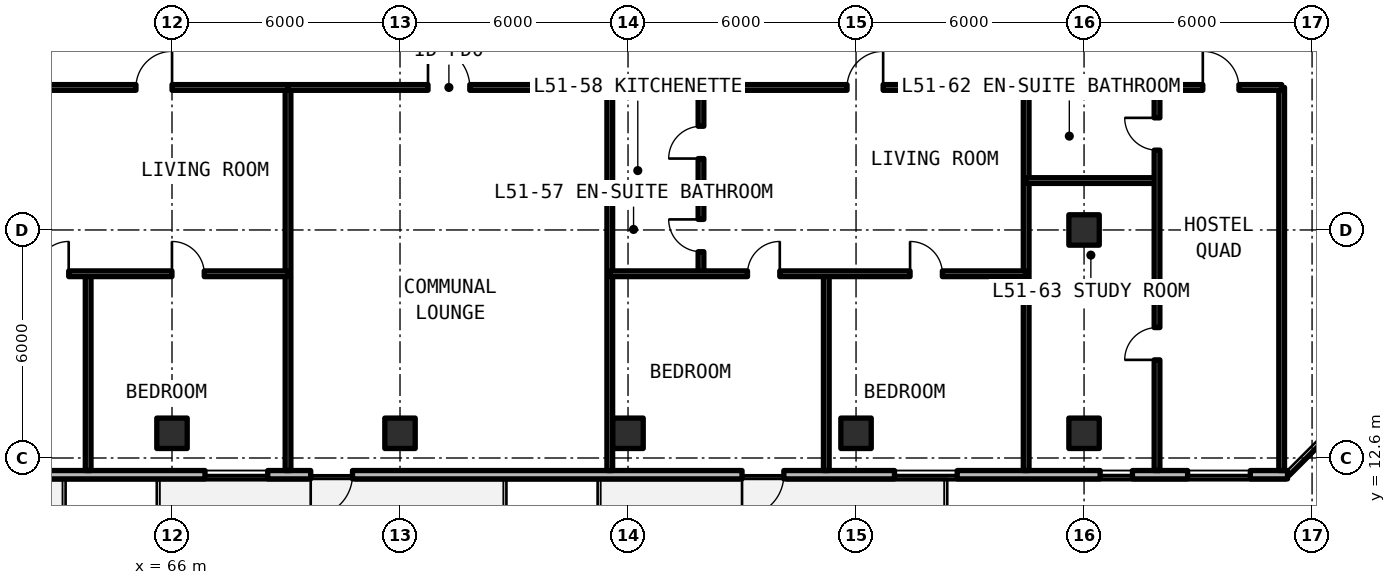
"""IFC4 building model, lengths in metres.
Left out: names, types, materials, properties, quantities, classifications, styles, units other than length and angle.
Written with IfcOpenShell. Run it as: python <this file> out.ifc"""

import sys

from ifc_helpers import new_model, si_unit, direction, frame, frame_2d, origin, origin_2d, place, context, subcontext, project, spatial, rectangle, extrude, element, fill, save


model = new_model("IFC4")
c1 = context("Model", 3, precision=1e-05, world=origin(), true_north=direction((0.0, 1.0)))
c2 = subcontext(c1, "Body", "Model", "MODEL_VIEW")
j1 = project(units=[si_unit("LENGTHUNIT", "METRE"), si_unit("PLANEANGLEUNIT", "RADIAN")], contexts=[c1])
p1 = place(None, origin())
s1 = spatial("IfcSite", under=j1, at=p1, CompositionType="ELEMENT")
p2 = place(p1, origin())
s2 = spatial("IfcBuilding", under=s1, at=p2, CompositionType="ELEMENT")
p3 = place(p2, frame((0.0, 0.0, 185.13)))
s3 = spatial("IfcBuildingStorey", under=s2, at=p3, CompositionType="ELEMENT", Elevation=185.13)
for number, where, z_axis, x_axis in (
    (1, (90.0, 18.6, 0.0), (0.0, 0.0, 1.0), (1.0, 0.0, 0.0)),
    (2, (66.0, 13.25, 0.0), (0.0, 0.0, 1.0), (1.0, 0.0, 0.0)),
    (3, (72.0, 13.25, 0.0), (0.0, 0.0, 1.0), (1.0, 0.0, 0.0)),
    (4, (78.0, 13.25, 0.0), (0.0, 0.0, 1.0), (1.0, 0.0, 0.0)),
    (5, (84.0, 13.25, 0.0), (0.0, 0.0, 1.0), (1.0, 0.0, 0.0)),
    (6, (90.0, 13.25, 0.0), (0.0, 0.0, 1.0), (1.0, 0.0, 0.0)),
):
    element("IfcColumn", number, at=place(p3, frame(where, z_axis=z_axis, x_axis=x_axis)), inside=s3, PredefinedType="COLUMN", context=c2, shape_type="SweptSolid", body=[
        extrude(rectangle(XDim=0.8, YDim=0.8, at=origin_2d()), origin(), (0.0, 0.0, 1.0), 3.3),
    ])
p4 = place(p3, frame((52.11, 12.16, 0.0), z_axis=(0.0, 0.0, 1.0), x_axis=(1.0, 0.0, 0.0)))
e7 = element("IfcWall", 7, at=p4, inside=s3, PredefinedType="SOLIDWALL", context=c2, shape_type="SweptSolid", body=[
    extrude(rectangle(XDim=43.244, YDim=0.22, at=frame_2d((21.622, 0.0))), origin(), (0.0, 0.0, 1.0), 3.08),
])
p5 = place(p4, frame((4.19, 0.0, 0.0)))
e8 = element("IfcOpeningElement", 8, at=p5, cuts=e7, PredefinedType="OPENING", context=c2, shape_type="SweptSolid", body=[
    extrude(rectangle(XDim=1.1, YDim=2.15, at=frame_2d((0.55, 1.075))), frame((0.0, 0.12, 0.0), z_axis=(0.0, -1.0, 0.0), x_axis=(1.0, 0.0, 0.0)), (0.0, 0.0, 1.0), 0.24),
])
p6 = place(p4, frame((17.54, 0.0, 0.0)))
e9 = element("IfcOpeningElement", 9, at=p6, cuts=e7, PredefinedType="OPENING", context=c2, shape_type="SweptSolid", body=[
    extrude(rectangle(XDim=1.1, YDim=2.15, at=frame_2d((0.55, 1.075))), frame((0.0, 0.12, 0.0), z_axis=(0.0, -1.0, 0.0), x_axis=(1.0, 0.0, 0.0)), (0.0, 0.0, 1.0), 0.24),
])
p7 = place(p4, frame((28.89, 0.0, 0.0)))
e10 = element("IfcOpeningElement", 10, at=p7, cuts=e7, PredefinedType="OPENING", context=c2, shape_type="SweptSolid", body=[
    extrude(rectangle(XDim=1.1, YDim=2.15, at=frame_2d((0.55, 1.075))), frame((0.0, 0.12, 0.0), z_axis=(0.0, -1.0, 0.0), x_axis=(1.0, 0.0, 0.0)), (0.0, 0.0, 1.0), 0.24),
])
p8 = place(p4, frame((8.66, 0.0, 0.78)))
e11 = element("IfcOpeningElement", 11, at=p8, cuts=e7, PredefinedType="OPENING", context=c2, shape_type="SweptSolid", body=[
    extrude(rectangle(XDim=1.65, YDim=1.66, at=frame_2d((0.825, 0.83))), frame((0.0, 0.12, 0.0), z_axis=(0.0, -1.0, 0.0), x_axis=(1.0, 0.0, 0.0)), (0.0, 0.0, 1.0), 0.24),
])
p9 = place(p4, frame((14.759, 0.0, 0.78)))
e12 = element("IfcOpeningElement", 12, at=p9, cuts=e7, PredefinedType="OPENING", context=c2, shape_type="SweptSolid", body=[
    extrude(rectangle(XDim=1.65, YDim=1.66, at=frame_2d((0.825, 0.83))), frame((0.0, 0.12, 0.0), z_axis=(0.0, -1.0, 0.0), x_axis=(1.0, 0.0, 0.0)), (0.0, 0.0, 1.0), 0.24),
])
p10 = place(p4, frame((32.902, 0.0, 0.78)))
e13 = element("IfcOpeningElement", 13, at=p10, cuts=e7, PredefinedType="OPENING", context=c2, shape_type="SweptSolid", body=[
    extrude(rectangle(XDim=1.65, YDim=1.66, at=frame_2d((0.825, 0.83))), frame((0.0, 0.12, 0.0), z_axis=(0.0, -1.0, 0.0), x_axis=(1.0, 0.0, 0.0)), (0.0, 0.0, 1.0), 0.24),
])
p11 = place(p4, frame((38.313, 0.0, 0.78)))
e14 = element("IfcOpeningElement", 14, at=p11, cuts=e7, PredefinedType="OPENING", context=c2, shape_type="SweptSolid", body=[
    extrude(rectangle(XDim=0.85, YDim=1.65, at=frame_2d((0.425, 0.825))), frame((0.0, 0.12, 0.0), z_axis=(0.0, -1.0, 0.0), x_axis=(1.0, 0.0, 0.0)), (0.0, 0.0, 1.0), 0.24),
])
p12 = place(p4, frame((40.615, 0.0, 0.78)))
e15 = element("IfcOpeningElement", 15, at=p12, cuts=e7, PredefinedType="OPENING", context=c2, shape_type="SweptSolid", body=[
    extrude(rectangle(XDim=1.65, YDim=1.66, at=frame_2d((0.825, 0.83))), frame((0.0, 0.12, 0.0), z_axis=(0.0, -1.0, 0.0), x_axis=(1.0, 0.0, 0.0)), (0.0, 0.0, 1.0), 0.24),
])
for number, where, z_axis, x_axis in (
    (16, (95.2, 12.27, 0.0), (0.0, 0.0, 1.0), (0.0, 1.0, 0.0)),
    (17, (69.053, 12.27, 0.0), (0.0, 0.0, 1.0), (0.0, 1.0, 0.0)),
):
    element("IfcWall", number, at=place(p3, frame(where, z_axis=z_axis, x_axis=x_axis)), inside=s3, PredefinedType="SOLIDWALL", context=c2, shape_type="SweptSolid", body=[
        extrude(rectangle(XDim=10.08, YDim=0.15, at=frame_2d((5.04, 0.0))), origin(), (0.0, 0.0, 1.0), 2.35),
    ])
p13 = place(p3, frame((63.794, 12.27, 0.0), z_axis=(0.0, 0.0, 1.0), x_axis=(0.0, 1.0, 0.0)))
e18 = element("IfcWall", 18, at=p13, inside=s3, PredefinedType="PARTITIONING", context=c2, shape_type="SweptSolid", body=[
    extrude(rectangle(XDim=5.178, YDim=0.15, at=frame_2d((2.589, 0.0))), origin(), (0.0, 0.0, 1.0), 2.35),
])
p14 = place(p3, frame((58.096, 17.448, 0.0), z_axis=(0.0, 0.0, 1.0), x_axis=(1.0, 0.0, 0.0)))
e19 = element("IfcWall", 19, at=p14, inside=s3, PredefinedType="PARTITIONING", context=c2, shape_type="SweptSolid", body=[
    extrude(rectangle(XDim=10.957, YDim=0.15, at=frame_2d((5.479, 0.0))), origin(), (0.0, 0.0, 1.0), 2.35),
])
p15 = place(p14, frame((4.335, 0.0, 0.0)))
e20 = element("IfcOpeningElement", 20, at=p15, cuts=e19, PredefinedType="OPENING", context=c2, shape_type="SweptSolid", body=[
    extrude(rectangle(XDim=0.85, YDim=2.1, at=frame_2d((0.425, 1.05))), frame((0.0, 0.085, 0.0), z_axis=(0.0, -1.0, 0.0), x_axis=(1.0, 0.0, 0.0)), (0.0, 0.0, 1.0), 0.17),
])
p16 = place(p14, frame((7.902, 0.0, 0.0)))
e21 = element("IfcOpeningElement", 21, at=p16, cuts=e19, PredefinedType="OPENING", context=c2, shape_type="SweptSolid", body=[
    extrude(rectangle(XDim=0.85, YDim=2.1, at=frame_2d((0.425, 1.05))), frame((0.0, 0.085, 0.0), z_axis=(0.0, -1.0, 0.0), x_axis=(1.0, 0.0, 0.0)), (0.0, 0.0, 1.0), 0.17),
])
p17 = place(p3, frame((58.096, 22.35, 0.0), z_axis=(0.0, 0.0, 1.0), x_axis=(1.0, 0.0, 0.0)))
e22 = element("IfcWall", 22, at=p17, inside=s3, PredefinedType="SOLIDWALL", context=c2, shape_type="SweptSolid", body=[
    extrude(rectangle(XDim=10.957, YDim=0.15, at=frame_2d((5.479, 0.0))), origin(), (0.0, 0.0, 1.0), 2.35),
])
p18 = place(p17, frame((6.955, 0.0, 0.0)))
e23 = element("IfcOpeningElement", 23, at=p18, cuts=e22, PredefinedType="OPENING", context=c2, shape_type="SweptSolid", body=[
    extrude(rectangle(XDim=0.95, YDim=2.15, at=frame_2d((0.475, 1.075))), frame((0.0, 0.085, 0.0), z_axis=(0.0, -1.0, 0.0), x_axis=(1.0, 0.0, 0.0)), (0.0, 0.0, 1.0), 0.17),
])
p19 = place(p3, frame((77.52, 12.27, 0.0), z_axis=(0.0, 0.0, 1.0), x_axis=(0.0, 1.0, 0.0)))
e24 = element("IfcWall", 24, at=p19, inside=s3, PredefinedType="SOLIDWALL", context=c2, shape_type="SweptSolid", body=[
    extrude(rectangle(XDim=10.08, YDim=0.15, at=frame_2d((5.04, 0.0))), origin(), (0.0, 0.0, 1.0), 2.35),
])
p20 = place(p3, frame((69.053, 22.35, 0.0), z_axis=(0.0, 0.0, 1.0), x_axis=(1.0, 0.0, 0.0)))
e25 = element("IfcWall", 25, at=p20, inside=s3, PredefinedType="SOLIDWALL", context=c2, shape_type="SweptSolid", body=[
    extrude(rectangle(XDim=8.467, YDim=0.15, at=frame_2d((4.233, 0.0))), origin(), (0.0, 0.0, 1.0), 2.35),
])
p21 = place(p20, frame((3.683, 0.0, 0.0)))
e26 = element("IfcOpeningElement", 26, at=p21, cuts=e25, PredefinedType="OPENING", context=c2, shape_type="SweptSolid", body=[
    extrude(rectangle(XDim=1.1, YDim=2.15, at=frame_2d((0.55, 1.075))), frame((0.0, 0.085, 0.0), z_axis=(0.0, -1.0, 0.0), x_axis=(1.0, 0.0, 0.0)), (0.0, 0.0, 1.0), 0.17),
])
p22 = place(p3, frame((88.477, 12.27, 0.0), z_axis=(0.0, 0.0, 1.0), x_axis=(0.0, 1.0, 0.0)))
e27 = element("IfcWall", 27, at=p22, inside=s3, PredefinedType="SOLIDWALL", context=c2, shape_type="SweptSolid", body=[
    extrude(rectangle(XDim=10.08, YDim=0.15, at=frame_2d((5.04, 0.0))), origin(), (0.0, 0.0, 1.0), 2.35),
])
p23 = place(p3, frame((77.52, 19.458, 0.0), z_axis=(0.0, 0.0, 1.0), x_axis=(1.0, 0.0, 0.0)))
e28 = element("IfcWall", 28, at=p23, inside=s3, PredefinedType="PARTITIONING", context=c2, shape_type="SweptSolid", body=[
    extrude(rectangle(XDim=2.4, YDim=0.15, at=frame_2d((1.2, 0.0))), origin(), (0.0, 0.0, 1.0), 2.35),
])
p24 = place(p3, frame((79.92, 17.448, 0.0), z_axis=(0.0, 0.0, 1.0), x_axis=(0.0, 1.0, 0.0)))
e29 = element("IfcWall", 29, at=p24, inside=s3, PredefinedType="PARTITIONING", context=c2, shape_type="SweptSolid", body=[
    extrude(rectangle(XDim=4.902, YDim=0.15, at=frame_2d((2.451, 0.0))), origin(), (0.0, 0.0, 1.0), 2.35),
])
p25 = place(p24, frame((0.58, 0.0, 0.0)))
e30 = element("IfcOpeningElement", 30, at=p25, cuts=e29, PredefinedType="OPENING", context=c2, shape_type="SweptSolid", body=[
    extrude(rectangle(XDim=0.85, YDim=2.1, at=frame_2d((0.425, 1.05))), frame((0.0, 0.085, 0.0), z_axis=(0.0, -1.0, 0.0), x_axis=(1.0, 0.0, 0.0)), (0.0, 0.0, 1.0), 0.17),
])
p26 = place(p24, frame((3.031, 0.0, 0.0)))
e31 = element("IfcOpeningElement", 31, at=p26, cuts=e29, PredefinedType="OPENING", context=c2, shape_type="SweptSolid", body=[
    extrude(rectangle(XDim=0.85, YDim=2.1, at=frame_2d((0.425, 1.05))), frame((0.0, 0.085, 0.0), z_axis=(0.0, -1.0, 0.0), x_axis=(1.0, 0.0, 0.0)), (0.0, 0.0, 1.0), 0.17),
])
p27 = place(p3, frame((83.217, 12.27, 0.0), z_axis=(0.0, 0.0, 1.0), x_axis=(0.0, 1.0, 0.0)))
e32 = element("IfcWall", 32, at=p27, inside=s3, PredefinedType="PARTITIONING", context=c2, shape_type="SweptSolid", body=[
    extrude(rectangle(XDim=5.178, YDim=0.15, at=frame_2d((2.589, 0.0))), origin(), (0.0, 0.0, 1.0), 2.35),
])
p28 = place(p3, frame((77.52, 17.448, 0.0), z_axis=(0.0, 0.0, 1.0), x_axis=(1.0, 0.0, 0.0)))
e33 = element("IfcWall", 33, at=p28, inside=s3, PredefinedType="PARTITIONING", context=c2, shape_type="SweptSolid", body=[
    extrude(rectangle(XDim=10.957, YDim=0.15, at=frame_2d((5.479, 0.0))), origin(), (0.0, 0.0, 1.0), 2.35),
])
p29 = place(p28, frame((3.624, 0.0, 0.0)))
e34 = element("IfcOpeningElement", 34, at=p29, cuts=e33, PredefinedType="OPENING", context=c2, shape_type="SweptSolid", body=[
    extrude(rectangle(XDim=0.85, YDim=2.1, at=frame_2d((0.425, 1.05))), frame((0.0, 0.085, 0.0), z_axis=(0.0, -1.0, 0.0), x_axis=(1.0, 0.0, 0.0)), (0.0, 0.0, 1.0), 0.17),
])
p30 = place(p28, frame((7.902, 0.0, 0.0)))
e35 = element("IfcOpeningElement", 35, at=p30, cuts=e33, PredefinedType="OPENING", context=c2, shape_type="SweptSolid", body=[
    extrude(rectangle(XDim=0.85, YDim=2.1, at=frame_2d((0.425, 1.05))), frame((0.0, 0.085, 0.0), z_axis=(0.0, -1.0, 0.0), x_axis=(1.0, 0.0, 0.0)), (0.0, 0.0, 1.0), 0.17),
])
p31 = place(p3, frame((77.52, 22.35, 0.0), z_axis=(0.0, 0.0, 1.0), x_axis=(1.0, 0.0, 0.0)))
e36 = element("IfcWall", 36, at=p31, inside=s3, PredefinedType="SOLIDWALL", context=c2, shape_type="SweptSolid", body=[
    extrude(rectangle(XDim=10.957, YDim=0.15, at=frame_2d((5.479, 0.0))), origin(), (0.0, 0.0, 1.0), 2.35),
])
p32 = place(p31, frame((6.243, 0.0, 0.0)))
e37 = element("IfcOpeningElement", 37, at=p32, cuts=e36, PredefinedType="OPENING", context=c2, shape_type="SweptSolid", body=[
    extrude(rectangle(XDim=0.95, YDim=2.15, at=frame_2d((0.475, 1.075))), frame((0.0, 0.085, 0.0), z_axis=(0.0, -1.0, 0.0), x_axis=(1.0, 0.0, 0.0)), (0.0, 0.0, 1.0), 0.17),
])
p33 = place(p3, frame((88.477, 19.9, 0.0), z_axis=(0.0, 0.0, 1.0), x_axis=(1.0, 0.0, 0.0)))
e38 = element("IfcWall", 38, at=p33, inside=s3, PredefinedType="PARTITIONING", context=c2, shape_type="SweptSolid", body=[
    extrude(rectangle(XDim=3.443, YDim=0.15, at=frame_2d((1.722, 0.0))), origin(), (0.0, 0.0, 1.0), 2.35),
])
p34 = place(p3, frame((91.92, 12.27, 0.0), z_axis=(0.0, 0.0, 1.0), x_axis=(0.0, 1.0, 0.0)))
e39 = element("IfcWall", 39, at=p34, inside=s3, PredefinedType="PARTITIONING", context=c2, shape_type="SweptSolid", body=[
    extrude(rectangle(XDim=10.08, YDim=0.15, at=frame_2d((5.04, 0.0))), origin(), (0.0, 0.0, 1.0), 2.35),
])
p35 = place(p34, frame((2.912, 0.0, 0.0)))
e40 = element("IfcOpeningElement", 40, at=p35, cuts=e39, PredefinedType="OPENING", context=c2, shape_type="SweptSolid", body=[
    extrude(rectangle(XDim=0.85, YDim=2.1, at=frame_2d((0.425, 1.05))), frame((0.0, 0.085, 0.0), z_axis=(0.0, -1.0, 0.0), x_axis=(1.0, 0.0, 0.0)), (0.0, 0.0, 1.0), 0.17),
])
p36 = place(p34, frame((8.43, 0.0, 0.0)))
e41 = element("IfcOpeningElement", 41, at=p36, cuts=e39, PredefinedType="OPENING", context=c2, shape_type="SweptSolid", body=[
    extrude(rectangle(XDim=0.85, YDim=2.1, at=frame_2d((0.425, 1.05))), frame((0.0, 0.085, 0.0), z_axis=(0.0, -1.0, 0.0), x_axis=(1.0, 0.0, 0.0)), (0.0, 0.0, 1.0), 0.17),
])
p37 = place(p3, frame((88.477, 22.35, 0.0), z_axis=(0.0, 0.0, 1.0), x_axis=(1.0, 0.0, 0.0)))
e42 = element("IfcWall", 42, at=p37, inside=s3, PredefinedType="SOLIDWALL", context=c2, shape_type="SweptSolid", body=[
    extrude(rectangle(XDim=6.723, YDim=0.15, at=frame_2d((3.362, 0.0))), origin(), (0.0, 0.0, 1.0), 2.35),
])
p38 = place(p37, frame((4.648, 0.0, 0.0)))
e43 = element("IfcOpeningElement", 43, at=p38, cuts=e42, PredefinedType="OPENING", context=c2, shape_type="SweptSolid", body=[
    extrude(rectangle(XDim=0.95, YDim=2.15, at=frame_2d((0.475, 1.075))), frame((0.0, 0.085, 0.0), z_axis=(0.0, -1.0, 0.0), x_axis=(1.0, 0.0, 0.0)), (0.0, 0.0, 1.0), 0.17),
])
p39 = place(p6, frame((1.1, 0.0, 0.0), z_axis=(0.0, 0.0, 1.0), x_axis=(-1.0, 0.0, 0.0)))
e44 = element("IfcDoor", 44, at=p39, inside=s3, OperationType="SINGLE_SWING_LEFT", PredefinedType="DOOR", context=c2, shape_type="SweptSolid", body=[
    extrude(rectangle(XDim=1.1, YDim=2.15, at=frame_2d((0.55, 1.075))), frame((0.0, 0.025, 0.0), z_axis=(0.0, -1.0, 0.0), x_axis=(1.0, 0.0, 0.0)), (0.0, 0.0, 1.0), 0.05),
])
fill(e9, e44)
p40 = place(p7, frame((1.1, 0.0, 0.0), z_axis=(0.0, 0.0, 1.0), x_axis=(-1.0, 0.0, 0.0)))
e45 = element("IfcDoor", 45, at=p40, inside=s3, OperationType="SINGLE_SWING_RIGHT", PredefinedType="DOOR", context=c2, shape_type="SweptSolid", body=[
    extrude(rectangle(XDim=1.1, YDim=2.15, at=frame_2d((0.55, 1.075))), frame((0.0, 0.025, 0.0), z_axis=(0.0, -1.0, 0.0), x_axis=(1.0, 0.0, 0.0)), (0.0, 0.0, 1.0), 0.05),
])
fill(e10, e45)
p41 = place(p9, origin())
e46 = element("IfcWindow", 46, at=p41, inside=s3, PartitioningType="SINGLE_PANEL", PredefinedType="WINDOW", context=c2, shape_type="SweptSolid", body=[
    extrude(rectangle(XDim=1.65, YDim=1.66, at=frame_2d((0.825, 0.83))), frame((0.0, 0.03, 0.0), z_axis=(0.0, -1.0, 0.0), x_axis=(1.0, 0.0, 0.0)), (0.0, 0.0, 1.0), 0.06),
])
fill(e12, e46)
p42 = place(p10, origin())
e47 = element("IfcWindow", 47, at=p42, inside=s3, PartitioningType="SINGLE_PANEL", PredefinedType="WINDOW", context=c2, shape_type="SweptSolid", body=[
    extrude(rectangle(XDim=1.65, YDim=1.66, at=frame_2d((0.825, 0.83))), frame((0.0, 0.03, 0.0), z_axis=(0.0, -1.0, 0.0), x_axis=(1.0, 0.0, 0.0)), (0.0, 0.0, 1.0), 0.06),
])
fill(e13, e47)
p43 = place(p11, origin())
e48 = element("IfcWindow", 48, at=p43, inside=s3, PartitioningType="SINGLE_PANEL", PredefinedType="WINDOW", context=c2, shape_type="SweptSolid", body=[
    extrude(rectangle(XDim=0.85, YDim=1.65, at=frame_2d((0.425, 0.825))), frame((0.0, 0.03, 0.0), z_axis=(0.0, -1.0, 0.0), x_axis=(1.0, 0.0, 0.0)), (0.0, 0.0, 1.0), 0.06),
])
fill(e14, e48)
p44 = place(p12, origin())
e49 = element("IfcWindow", 49, at=p44, inside=s3, PartitioningType="SINGLE_PANEL", PredefinedType="WINDOW", context=c2, shape_type="SweptSolid", body=[
    extrude(rectangle(XDim=1.65, YDim=1.66, at=frame_2d((0.825, 0.83))), frame((0.0, 0.03, 0.0), z_axis=(0.0, -1.0, 0.0), x_axis=(1.0, 0.0, 0.0)), (0.0, 0.0, 1.0), 0.06),
])
fill(e15, e49)
p45 = place(p15, origin())
e50 = element("IfcDoor", 50, at=p45, inside=s3, OperationType="SINGLE_SWING_RIGHT", PredefinedType="DOOR", context=c2, shape_type="SweptSolid", body=[
    extrude(rectangle(XDim=0.85, YDim=2.1, at=frame_2d((0.425, 1.05))), frame((0.0, 0.025, 0.0), z_axis=(0.0, -1.0, 0.0), x_axis=(1.0, 0.0, 0.0)), (0.0, 0.0, 1.0), 0.05),
])
fill(e20, e50)
p46 = place(p16, origin())
e51 = element("IfcDoor", 51, at=p46, inside=s3, OperationType="SINGLE_SWING_LEFT", PredefinedType="DOOR", context=c2, shape_type="SweptSolid", body=[
    extrude(rectangle(XDim=0.85, YDim=2.1, at=frame_2d((0.425, 1.05))), frame((0.0, 0.025, 0.0), z_axis=(0.0, -1.0, 0.0), x_axis=(1.0, 0.0, 0.0)), (0.0, 0.0, 1.0), 0.05),
])
fill(e21, e51)
p47 = place(p18, origin())
e52 = element("IfcDoor", 52, at=p47, inside=s3, OperationType="SINGLE_SWING_RIGHT", PredefinedType="DOOR", context=c2, shape_type="SweptSolid", body=[
    extrude(rectangle(XDim=0.95, YDim=2.15, at=frame_2d((0.475, 1.075))), frame((0.0, 0.025, 0.0), z_axis=(0.0, -1.0, 0.0), x_axis=(1.0, 0.0, 0.0)), (0.0, 0.0, 1.0), 0.05),
])
fill(e23, e52)
p48 = place(p21, origin())
e53 = element("IfcDoor", 53, at=p48, inside=s3, OperationType="SINGLE_SWING_LEFT", PredefinedType="DOOR", context=c2, shape_type="SweptSolid", body=[
    extrude(rectangle(XDim=1.1, YDim=2.15, at=frame_2d((0.55, 1.075))), frame((0.0, 0.025, 0.0), z_axis=(0.0, -1.0, 0.0), x_axis=(1.0, 0.0, 0.0)), (0.0, 0.0, 1.0), 0.05),
])
fill(e26, e53)
p49 = place(p25, origin())
e54 = element("IfcDoor", 54, at=p49, inside=s3, OperationType="SINGLE_SWING_RIGHT", PredefinedType="DOOR", context=c2, shape_type="SweptSolid", body=[
    extrude(rectangle(XDim=0.85, YDim=2.1, at=frame_2d((0.425, 1.05))), frame((0.0, 0.025, 0.0), z_axis=(0.0, -1.0, 0.0), x_axis=(1.0, 0.0, 0.0)), (0.0, 0.0, 1.0), 0.05),
])
fill(e30, e54)
p50 = place(p26, origin())
e55 = element("IfcDoor", 55, at=p50, inside=s3, OperationType="SINGLE_SWING_LEFT", PredefinedType="DOOR", context=c2, shape_type="SweptSolid", body=[
    extrude(rectangle(XDim=0.85, YDim=2.1, at=frame_2d((0.425, 1.05))), frame((0.0, 0.025, 0.0), z_axis=(0.0, -1.0, 0.0), x_axis=(1.0, 0.0, 0.0)), (0.0, 0.0, 1.0), 0.05),
])
fill(e31, e55)
p51 = place(p29, origin())
e56 = element("IfcDoor", 56, at=p51, inside=s3, OperationType="SINGLE_SWING_RIGHT", PredefinedType="DOOR", context=c2, shape_type="SweptSolid", body=[
    extrude(rectangle(XDim=0.85, YDim=2.1, at=frame_2d((0.425, 1.05))), frame((0.0, 0.025, 0.0), z_axis=(0.0, -1.0, 0.0), x_axis=(1.0, 0.0, 0.0)), (0.0, 0.0, 1.0), 0.05),
])
fill(e34, e56)
p52 = place(p30, origin())
e57 = element("IfcDoor", 57, at=p52, inside=s3, OperationType="SINGLE_SWING_LEFT", PredefinedType="DOOR", context=c2, shape_type="SweptSolid", body=[
    extrude(rectangle(XDim=0.85, YDim=2.1, at=frame_2d((0.425, 1.05))), frame((0.0, 0.025, 0.0), z_axis=(0.0, -1.0, 0.0), x_axis=(1.0, 0.0, 0.0)), (0.0, 0.0, 1.0), 0.05),
])
fill(e35, e57)
p53 = place(p32, origin())
e58 = element("IfcDoor", 58, at=p53, inside=s3, OperationType="SINGLE_SWING_RIGHT", PredefinedType="DOOR", context=c2, shape_type="SweptSolid", body=[
    extrude(rectangle(XDim=0.95, YDim=2.15, at=frame_2d((0.475, 1.075))), frame((0.0, 0.025, 0.0), z_axis=(0.0, -1.0, 0.0), x_axis=(1.0, 0.0, 0.0)), (0.0, 0.0, 1.0), 0.05),
])
fill(e37, e58)
p54 = place(p35, origin())
e59 = element("IfcDoor", 59, at=p54, inside=s3, OperationType="SINGLE_SWING_LEFT", PredefinedType="DOOR", context=c2, shape_type="SweptSolid", body=[
    extrude(rectangle(XDim=0.85, YDim=2.1, at=frame_2d((0.425, 1.05))), frame((0.0, 0.025, 0.0), z_axis=(0.0, -1.0, 0.0), x_axis=(1.0, 0.0, 0.0)), (0.0, 0.0, 1.0), 0.05),
])
fill(e40, e59)
p55 = place(p36, origin())
e60 = element("IfcDoor", 60, at=p55, inside=s3, OperationType="SINGLE_SWING_RIGHT", PredefinedType="DOOR", context=c2, shape_type="SweptSolid", body=[
    extrude(rectangle(XDim=0.85, YDim=2.1, at=frame_2d((0.425, 1.05))), frame((0.0, 0.025, 0.0), z_axis=(0.0, -1.0, 0.0), x_axis=(1.0, 0.0, 0.0)), (0.0, 0.0, 1.0), 0.05),
])
fill(e41, e60)
p56 = place(p38, origin())
e61 = element("IfcDoor", 61, at=p56, inside=s3, OperationType="SINGLE_SWING_LEFT", PredefinedType="DOOR", context=c2, shape_type="SweptSolid", body=[
    extrude(rectangle(XDim=0.95, YDim=2.15, at=frame_2d((0.475, 1.075))), frame((0.0, 0.025, 0.0), z_axis=(0.0, -1.0, 0.0), x_axis=(1.0, 0.0, 0.0)), (0.0, 0.0, 1.0), 0.05),
])
fill(e43, e61)
save(model, sys.argv[1])
